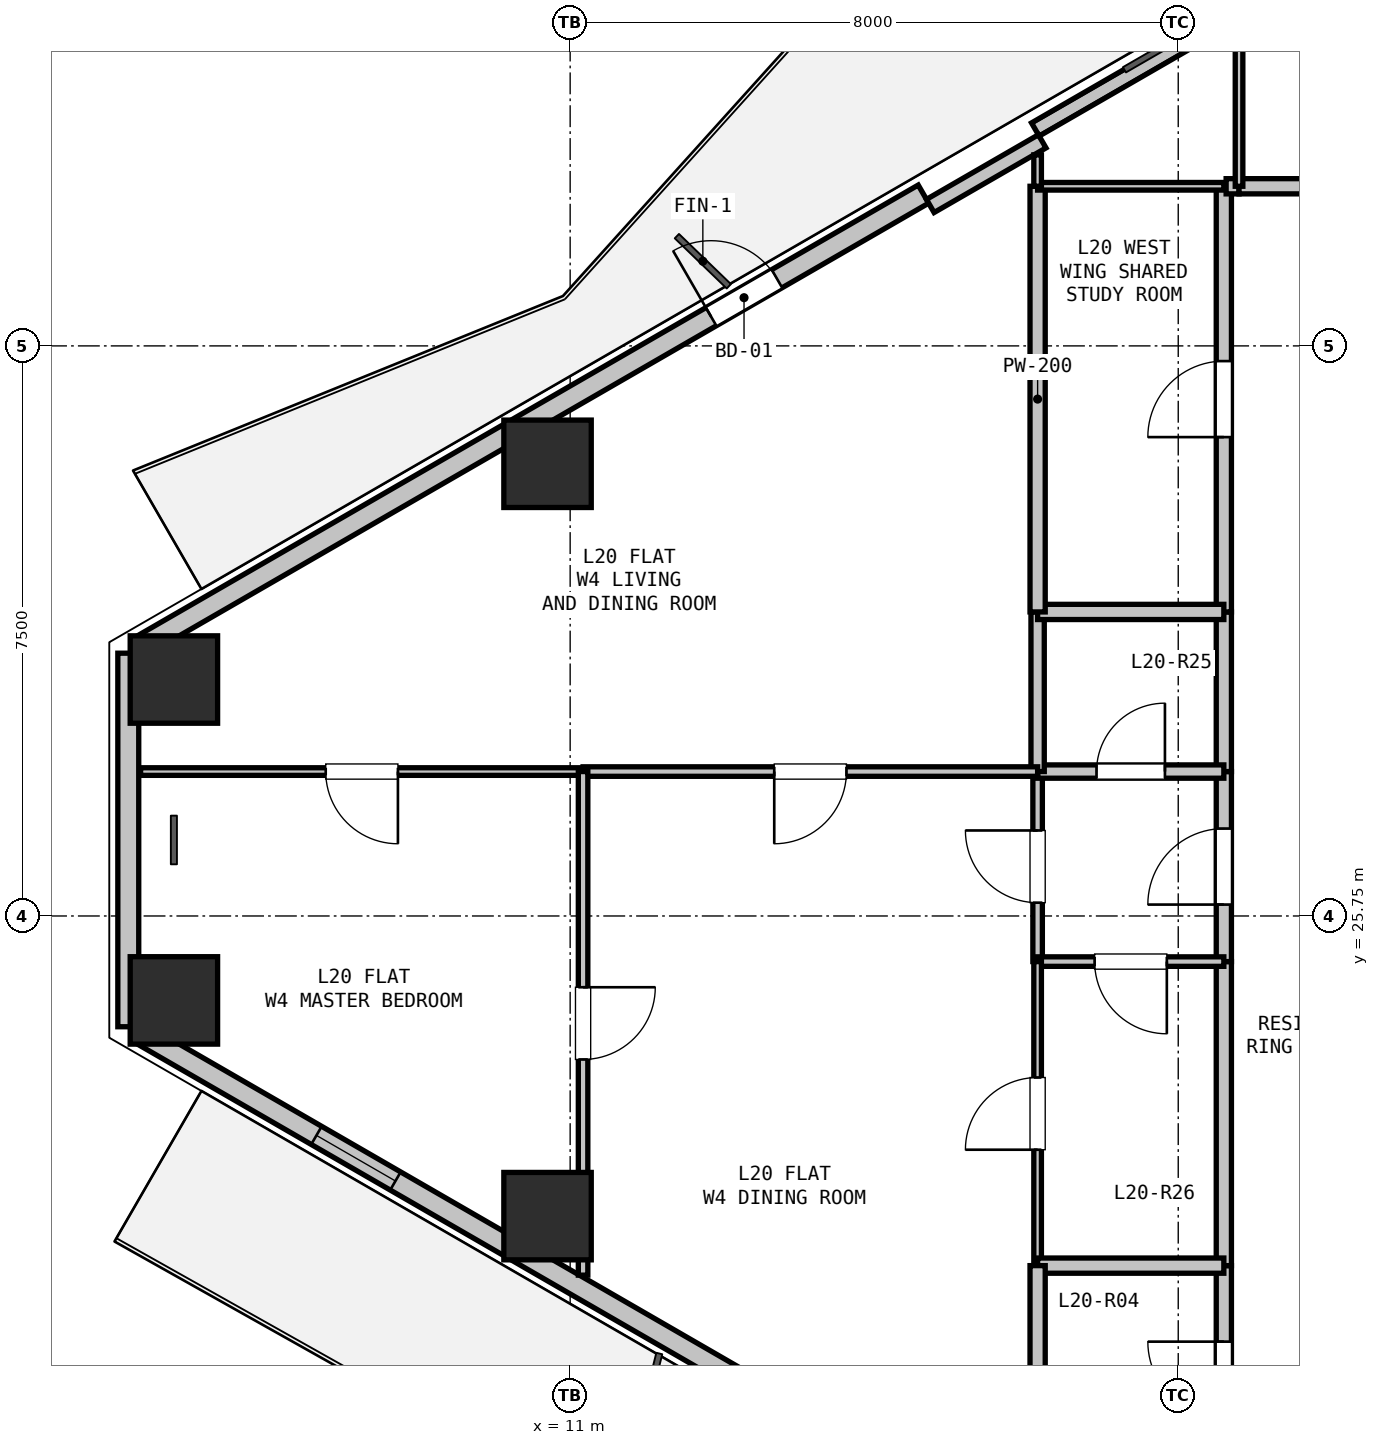
"""IFC4 building model, lengths in metres.
Left out: names, types, materials, properties, quantities, classifications, styles, units other than length and angle.
Written with IfcOpenShell. Run it as: python <this file> out.ifc"""

import sys

from ifc_helpers import new_model, si_unit, direction, frame, frame_2d, origin, origin_2d, place, context, subcontext, project, spatial, rectangle, hollow_rectangle, extrude, element, fill, save


model = new_model("IFC4")
c1 = context("Model", 3, precision=1e-05, world=origin(), true_north=direction((0.0, 1.0)))
c2 = subcontext(c1, "Body", "Model", "MODEL_VIEW")
j1 = project(units=[si_unit("LENGTHUNIT", "METRE"), si_unit("PLANEANGLEUNIT", "RADIAN")], contexts=[c1])
p1 = place(None, origin())
s1 = spatial("IfcSite", under=j1, at=p1, CompositionType="ELEMENT")
p2 = place(p1, origin())
s2 = spatial("IfcBuilding", under=s1, at=p2, CompositionType="ELEMENT")
p3 = place(p2, frame((0.0, 0.0, 76.8)))
s3 = spatial("IfcBuildingStorey", under=s2, at=p3, CompositionType="ELEMENT", Elevation=76.8)
for number, where, z_axis, x_axis in (
    (1, (5.787, 28.861, 0.0), (0.0, 0.0, 1.0), (1.0, 0.0, 0.0)),
    (2, (10.702, 31.699, 0.0), (0.0, 0.0, 1.0), (1.0, 0.0, 0.0)),
    (3, (10.702, 21.801, 0.0), (0.0, 0.0, 1.0), (1.0, 0.0, 0.0)),
    (4, (5.787, 24.639, 0.0), (0.0, 0.0, 1.0), (1.0, 0.0, 0.0)),
):
    element("IfcColumn", number, at=place(p3, frame(where, z_axis=z_axis, x_axis=x_axis)), inside=s3, PredefinedType="COLUMN", context=c2, shape_type="SweptSolid", body=[
        extrude(hollow_rectangle(XDim=1.15, YDim=1.15, WallThickness=0.032, at=origin_2d()), origin(), (0.0, 0.0, 1.0), 3.3),
    ])
p4 = place(p3, frame((5.187, 24.293, 0.0), z_axis=(0.0, 0.0, 1.0), x_axis=(0.0, 1.0, 0.0)))
e5 = element("IfcWall", 5, at=p4, inside=s3, PredefinedType="SOLIDWALL", context=c2, shape_type="SweptSolid", body=[
    extrude(rectangle(XDim=4.915, YDim=0.275, at=frame_2d((2.457, 0.0))), origin(), (0.0, 0.0, 1.0), 2.67),
])
p5 = place(p3, frame((5.317, 29.282, 0.0), z_axis=(0.0, 0.0, 1.0), x_axis=(0.866023023012, 0.500004123596, 0.0)))
e6 = element("IfcWall", 6, at=p5, inside=s3, PredefinedType="SOLIDWALL", context=c2, shape_type="SweptSolid", body=[
    extrude(rectangle(XDim=11.93, YDim=0.275, at=frame_2d((5.965, 0.0))), origin(), (0.0, 0.0, 1.0), 2.67),
])
p6 = place(p5, frame((8.704, 0.0, 0.0)))
e7 = element("IfcOpeningElement", 7, at=p6, cuts=e6, PredefinedType="OPENING", context=c2, shape_type="SweptSolid", body=[
    extrude(rectangle(XDim=1.0, YDim=2.1, at=frame_2d((0.5, 1.05))), frame((0.0, 0.147, 0.0), z_axis=(0.0, -1.0, 0.0), x_axis=(1.0, 0.0, 0.0)), (0.0, 0.0, 1.0), 0.295),
])
p7 = place(p3, frame((17.12, 36.097, 0.0), z_axis=(0.0, 0.0, 1.0), x_axis=(0.866027010039, 0.499997217876, 0.0)))
e8 = element("IfcWall", 8, at=p7, inside=s3, PredefinedType="PARAPET", context=c2, shape_type="SweptSolid", body=[
    extrude(rectangle(XDim=11.229, YDim=0.2, at=frame_2d((5.615, 0.0))), origin(), (0.0, 0.0, 1.0), 0.2),
])
p8 = place(p3, frame((15.738, 35.091, 0.0), z_axis=(0.0, 0.0, 1.0), x_axis=(0.866025371046, 0.500000056704, 0.0)))
e9 = element("IfcWall", 9, at=p8, inside=s3, PredefinedType="PARAPET", context=c2, shape_type="SweptSolid", body=[
    extrude(rectangle(XDim=1.7, YDim=0.2, at=frame_2d((0.85, 0.0))), origin(), (0.0, 0.0, 1.0), 2.67),
])
p9 = place(p3, frame((15.648, 18.253, 0.0), z_axis=(0.0, 0.0, 1.0), x_axis=(-0.866023023012, 0.500004123596, 0.0)))
e10 = element("IfcWall", 10, at=p9, inside=s3, PredefinedType="SOLIDWALL", context=c2, shape_type="SweptSolid", body=[
    extrude(rectangle(XDim=11.93, YDim=0.275, at=frame_2d((5.965, 0.0))), origin(), (0.0, 0.0, 1.0), 2.67),
])
p10 = place(p9, frame((8.021, 0.0, 0.9)))
e11 = element("IfcOpeningElement", 11, at=p10, cuts=e10, PredefinedType="OPENING", context=c2, shape_type="SweptSolid", body=[
    extrude(rectangle(XDim=1.2, YDim=1.4, at=frame_2d((0.6, 0.7))), frame((0.0, 0.147, 0.0), z_axis=(0.0, -1.0, 0.0), x_axis=(1.0, 0.0, 0.0)), (0.0, 0.0, 1.0), 0.295),
])
p11 = place(p3, frame((19.6, 18.15, 0.0), z_axis=(0.0, 0.0, 1.0), x_axis=(0.0, 1.0, 0.0)))
e12 = element("IfcWall", 12, at=p11, inside=s3, PredefinedType="PARTITIONING", context=c2, shape_type="SweptSolid", body=[
    extrude(rectangle(XDim=3.0, YDim=0.2, at=frame_2d((1.5, 0.0))), origin(), (0.0, 0.0, 1.0), 2.423),
])
p12 = place(p11, frame((1.0, 0.0, 0.0)))
e13 = element("IfcOpeningElement", 13, at=p12, cuts=e12, PredefinedType="OPENING", context=c2, shape_type="SweptSolid", body=[
    extrude(rectangle(XDim=1.0, YDim=2.15, at=frame_2d((0.5, 1.075))), frame((0.0, 0.11, 0.0), z_axis=(0.0, -1.0, 0.0), x_axis=(1.0, 0.0, 0.0)), (0.0, 0.0, 1.0), 0.22),
])
p13 = place(p3, frame((19.6, 21.15, 0.0), z_axis=(0.0, 0.0, 1.0), x_axis=(0.0, 1.0, 0.0)))
e14 = element("IfcWall", 14, at=p13, inside=s3, PredefinedType="PARTITIONING", context=c2, shape_type="SweptSolid", body=[
    extrude(rectangle(XDim=4.0, YDim=0.2, at=frame_2d((2.0, 0.0))), origin(), (0.0, 0.0, 1.0), 2.423),
])
p14 = place(p3, frame((19.6, 25.15, 0.0), z_axis=(0.0, 0.0, 1.0), x_axis=(0.0, 1.0, 0.0)))
e15 = element("IfcWall", 15, at=p14, inside=s3, PredefinedType="PARTITIONING", context=c2, shape_type="SweptSolid", body=[
    extrude(rectangle(XDim=2.5, YDim=0.2, at=frame_2d((1.25, 0.0))), origin(), (0.0, 0.0, 1.0), 3.05),
])
p15 = place(p14, frame((0.75, 0.0, 0.0)))
e16 = element("IfcOpeningElement", 16, at=p15, cuts=e15, PredefinedType="OPENING", context=c2, shape_type="SweptSolid", body=[
    extrude(rectangle(XDim=1.0, YDim=2.15, at=frame_2d((0.5, 1.075))), frame((0.0, 0.11, 0.0), z_axis=(0.0, -1.0, 0.0), x_axis=(1.0, 0.0, 0.0)), (0.0, 0.0, 1.0), 0.22),
])
p16 = place(p3, frame((19.6, 27.65, 0.0), z_axis=(0.0, 0.0, 1.0), x_axis=(0.0, 1.0, 0.0)))
e17 = element("IfcWall", 17, at=p16, inside=s3, PredefinedType="PARTITIONING", context=c2, shape_type="SweptSolid", body=[
    extrude(rectangle(XDim=2.1, YDim=0.2, at=frame_2d((1.05, 0.0))), origin(), (0.0, 0.0, 1.0), 3.05),
])
p17 = place(p3, frame((19.6, 29.75, 0.0), z_axis=(0.0, 0.0, 1.0), x_axis=(0.0, 1.0, 0.0)))
e18 = element("IfcWall", 18, at=p17, inside=s3, PredefinedType="PARTITIONING", context=c2, shape_type="SweptSolid", body=[
    extrude(rectangle(XDim=5.6, YDim=0.2, at=frame_2d((2.8, 0.0))), origin(), (0.0, 0.0, 1.0), 2.423),
])
p18 = place(p17, frame((2.3, 0.0, 0.0)))
e19 = element("IfcOpeningElement", 19, at=p18, cuts=e18, PredefinedType="OPENING", context=c2, shape_type="SweptSolid", body=[
    extrude(rectangle(XDim=1.0, YDim=2.15, at=frame_2d((0.5, 1.075))), frame((0.0, 0.11, 0.0), z_axis=(0.0, -1.0, 0.0), x_axis=(1.0, 0.0, 0.0)), (0.0, 0.0, 1.0), 0.22),
])
p19 = place(p3, frame((19.63, 35.35, 0.0), z_axis=(0.0, 0.0, 1.0), x_axis=(1.0, 0.0, 0.0)))
e20 = element("IfcWall", 20, at=p19, inside=s3, PredefinedType="PARTITIONING", context=c2, shape_type="SweptSolid", body=[
    extrude(rectangle(XDim=0.17, YDim=0.2, at=frame_2d((0.085, 0.0))), origin(), (0.0, 0.0, 1.0), 3.05),
])
p20 = place(p3, frame((19.8, 35.35, 0.0), z_axis=(0.0, 0.0, 1.0), x_axis=(1.0, 0.0, 0.0)))
e21 = element("IfcWall", 21, at=p20, inside=s3, PredefinedType="PARTITIONING", context=c2, shape_type="SweptSolid", body=[
    extrude(rectangle(XDim=5.2, YDim=0.2, at=frame_2d((2.6, 0.0))), origin(), (0.0, 0.0, 1.0), 3.05),
])
p21 = place(p20, frame((2.672, 0.0, 0.0)))
e22 = element("IfcOpeningElement", 22, at=p21, cuts=e21, PredefinedType="OPENING", context=c2, shape_type="SweptSolid", body=[
    extrude(rectangle(XDim=1.8, YDim=2.2, at=frame_2d((0.9, 1.1))), frame((0.0, 0.11, 0.0), z_axis=(0.0, -1.0, 0.0), x_axis=(1.0, 0.0, 0.0)), (0.0, 0.0, 1.0), 0.22),
])
p22 = place(p3, frame((17.15, 25.15, 0.0), z_axis=(0.0, 0.0, 1.0), x_axis=(0.0, 1.0, 0.0)))
e23 = element("IfcWall", 23, at=p22, inside=s3, PredefinedType="PARTITIONING", context=c2, shape_type="SweptSolid", body=[
    extrude(rectangle(XDim=2.5, YDim=0.125, at=frame_2d((1.25, 0.0))), origin(), (0.0, 0.0, 1.0), 3.05),
])
p23 = place(p22, frame((0.775, 0.0, 0.0)))
e24 = element("IfcOpeningElement", 24, at=p23, cuts=e23, PredefinedType="OPENING", context=c2, shape_type="SweptSolid", body=[
    extrude(rectangle(XDim=0.95, YDim=2.1, at=frame_2d((0.475, 1.05))), frame((0.0, 0.073, 0.0), z_axis=(0.0, -1.0, 0.0), x_axis=(1.0, 0.0, 0.0)), (0.0, 0.0, 1.0), 0.145),
])
p24 = place(p3, frame((17.15, 27.65, 0.0), z_axis=(0.0, 0.0, 1.0), x_axis=(1.0, 0.0, 0.0)))
e25 = element("IfcWall", 25, at=p24, inside=s3, PredefinedType="PLUMBINGWALL", context=c2, shape_type="SweptSolid", body=[
    extrude(rectangle(XDim=2.45, YDim=0.175, at=frame_2d((1.225, 0.0))), origin(), (0.0, 0.0, 1.0), 3.05),
])
p25 = place(p24, frame((0.775, 0.0, 0.0)))
e26 = element("IfcOpeningElement", 26, at=p25, cuts=e25, PredefinedType="OPENING", context=c2, shape_type="SweptSolid", body=[
    extrude(rectangle(XDim=0.9, YDim=2.1, at=frame_2d((0.45, 1.05))), frame((0.0, 0.097, 0.0), z_axis=(0.0, -1.0, 0.0), x_axis=(1.0, 0.0, 0.0)), (0.0, 0.0, 1.0), 0.195),
])
p26 = place(p3, frame((19.6, 25.15, 0.0), z_axis=(0.0, 0.0, 1.0), x_axis=(-1.0, 0.0, 0.0)))
e27 = element("IfcWall", 27, at=p26, inside=s3, PredefinedType="PARTITIONING", context=c2, shape_type="SweptSolid", body=[
    extrude(rectangle(XDim=2.45, YDim=0.125, at=frame_2d((1.225, 0.0))), origin(), (0.0, 0.0, 1.0), 3.05),
])
p27 = place(p26, frame((0.75, 0.0, 0.0)))
e28 = element("IfcOpeningElement", 28, at=p27, cuts=e27, PredefinedType="OPENING", context=c2, shape_type="SweptSolid", body=[
    extrude(rectangle(XDim=0.95, YDim=2.1, at=frame_2d((0.475, 1.05))), frame((0.0, 0.073, 0.0), z_axis=(0.0, -1.0, 0.0), x_axis=(1.0, 0.0, 0.0)), (0.0, 0.0, 1.0), 0.145),
])
p28 = place(p3, frame((17.15, 27.65, 0.0), z_axis=(0.0, 0.0, 1.0), x_axis=(0.0, 1.0, 0.0)))
e29 = element("IfcWall", 29, at=p28, inside=s3, PredefinedType="PLUMBINGWALL", context=c2, shape_type="SweptSolid", body=[
    extrude(rectangle(XDim=2.1, YDim=0.175, at=frame_2d((1.05, 0.0))), origin(), (0.0, 0.0, 1.0), 3.05),
])
p29 = place(p3, frame((17.15, 29.75, 0.0), z_axis=(0.0, 0.0, 1.0), x_axis=(1.0, 0.0, 0.0)))
e30 = element("IfcWall", 30, at=p29, inside=s3, PredefinedType="PARTITIONING", context=c2, shape_type="SweptSolid", body=[
    extrude(rectangle(XDim=2.45, YDim=0.2, at=frame_2d((1.225, 0.0))), origin(), (0.0, 0.0, 1.0), 3.05),
])
p30 = place(p3, frame((17.15, 21.15, 0.0), z_axis=(0.0, 0.0, 1.0), x_axis=(0.0, 1.0, 0.0)))
e31 = element("IfcWall", 31, at=p30, inside=s3, PredefinedType="PARTITIONING", context=c2, shape_type="SweptSolid", body=[
    extrude(rectangle(XDim=4.0, YDim=0.1, at=frame_2d((2.0, 0.0))), origin(), (0.0, 0.0, 1.0), 2.423),
])
p31 = place(p30, frame((1.525, 0.0, 0.0)))
e32 = element("IfcOpeningElement", 32, at=p31, cuts=e31, PredefinedType="OPENING", context=c2, shape_type="SweptSolid", body=[
    extrude(rectangle(XDim=0.95, YDim=2.1, at=frame_2d((0.475, 1.05))), frame((0.0, 0.06, 0.0), z_axis=(0.0, -1.0, 0.0), x_axis=(1.0, 0.0, 0.0)), (0.0, 0.0, 1.0), 0.12),
])
p32 = place(p3, frame((19.6, 21.15, 0.0), z_axis=(0.0, 0.0, 1.0), x_axis=(-1.0, 0.0, 0.0)))
e33 = element("IfcWall", 33, at=p32, inside=s3, PredefinedType="PARTITIONING", context=c2, shape_type="SweptSolid", body=[
    extrude(rectangle(XDim=2.45, YDim=0.2, at=frame_2d((1.225, 0.0))), origin(), (0.0, 0.0, 1.0), 2.423),
])
p33 = place(p3, frame((19.8, 35.35, 0.0), z_axis=(0.0, 0.0, 1.0), x_axis=(0.0, 1.0, 0.0)))
e34 = element("IfcWall", 34, at=p33, inside=s3, PredefinedType="PARTITIONING", context=c2, shape_type="SweptSolid", body=[
    extrude(rectangle(XDim=2.252, YDim=0.1, at=frame_2d((1.126, 0.0))), origin(), (0.0, 0.0, 1.0), 2.365),
])
p34 = place(p3, frame((17.15, 29.75, 0.0), z_axis=(0.0, 0.0, 1.0), x_axis=(0.0, 1.0, 0.0)))
e35 = element("IfcWall", 35, at=p34, inside=s3, PredefinedType="PARTITIONING", context=c2, shape_type="SweptSolid", body=[
    extrude(rectangle(XDim=5.6, YDim=0.2, at=frame_2d((2.8, 0.0))), origin(), (0.0, 0.0, 1.0), 2.365),
])
p35 = place(p3, frame((17.15, 35.35, 0.0), z_axis=(0.0, 0.0, 1.0), x_axis=(1.0, 0.0, 0.0)))
e36 = element("IfcWall", 36, at=p35, inside=s3, PredefinedType="PARTITIONING", context=c2, shape_type="SweptSolid", body=[
    extrude(rectangle(XDim=2.45, YDim=0.1, at=frame_2d((1.225, 0.0))), origin(), (0.0, 0.0, 1.0), 2.365),
])
p36 = place(p3, frame((17.15, 17.737, 0.0), z_axis=(0.0, 0.0, 1.0), x_axis=(0.0, 1.0, 0.0)))
e37 = element("IfcWall", 37, at=p36, inside=s3, PredefinedType="PARTITIONING", context=c2, shape_type="SweptSolid", body=[
    extrude(rectangle(XDim=3.413, YDim=0.2, at=frame_2d((1.707, 0.0))), origin(), (0.0, 0.0, 1.0), 2.365),
])
p37 = place(p3, frame((17.15, 35.763, 0.0), z_axis=(0.0, 0.0, 1.0), x_axis=(0.0, -1.0, 0.0)))
e38 = element("IfcWall", 38, at=p37, inside=s3, PredefinedType="PARTITIONING", context=c2, shape_type="SweptSolid", body=[
    extrude(rectangle(XDim=0.413, YDim=0.1, at=frame_2d((0.207, 0.0))), origin(), (0.0, 0.0, 1.0), 2.365),
])
p38 = place(p3, frame((17.15, 27.65, 0.0), z_axis=(0.0, 0.0, 1.0), x_axis=(-1.0, 0.0, 0.0)))
e39 = element("IfcWall", 39, at=p38, inside=s3, PredefinedType="PARTITIONING", context=c2, shape_type="SweptSolid", body=[
    extrude(rectangle(XDim=5.98, YDim=0.125, at=frame_2d((2.99, 0.0))), origin(), (0.0, 0.0, 1.0), 3.05),
])
p39 = place(p38, frame((2.515, 0.0, 0.0)))
e40 = element("IfcOpeningElement", 40, at=p39, cuts=e39, PredefinedType="OPENING", context=c2, shape_type="SweptSolid", body=[
    extrude(rectangle(XDim=0.95, YDim=2.1, at=frame_2d((0.475, 1.05))), frame((0.0, 0.073, 0.0), z_axis=(0.0, -1.0, 0.0), x_axis=(1.0, 0.0, 0.0)), (0.0, 0.0, 1.0), 0.145),
])
p40 = place(p3, frame((11.17, 27.65, 0.0), z_axis=(0.0, 0.0, 1.0), x_axis=(-1.0, 0.0, 0.0)))
e41 = element("IfcWall", 41, at=p40, inside=s3, PredefinedType="PARTITIONING", context=c2, shape_type="SweptSolid", body=[
    extrude(rectangle(XDim=5.822, YDim=0.1, at=frame_2d((2.911, 0.0))), origin(), (0.0, 0.0, 1.0), 2.66),
])
p41 = place(p40, frame((2.436, 0.0, 0.0)))
e42 = element("IfcOpeningElement", 42, at=p41, cuts=e41, PredefinedType="OPENING", context=c2, shape_type="SweptSolid", body=[
    extrude(rectangle(XDim=0.95, YDim=2.1, at=frame_2d((0.475, 1.05))), frame((0.0, 0.06, 0.0), z_axis=(0.0, -1.0, 0.0), x_axis=(1.0, 0.0, 0.0)), (0.0, 0.0, 1.0), 0.12),
])
p42 = place(p3, frame((11.17, 27.65, 0.0), z_axis=(0.0, 0.0, 1.0), x_axis=(0.0, -1.0, 0.0)))
e43 = element("IfcWall", 43, at=p42, inside=s3, PredefinedType="PARTITIONING", context=c2, shape_type="SweptSolid", body=[
    extrude(rectangle(XDim=6.625, YDim=0.125, at=frame_2d((3.312, 0.0))), origin(), (0.0, 0.0, 1.0), 2.365),
])
p43 = place(p42, frame((2.838, 0.0, 0.0)))
e44 = element("IfcOpeningElement", 44, at=p43, cuts=e43, PredefinedType="OPENING", context=c2, shape_type="SweptSolid", body=[
    extrude(rectangle(XDim=0.95, YDim=2.1, at=frame_2d((0.475, 1.05))), frame((0.0, 0.073, 0.0), z_axis=(0.0, -1.0, 0.0), x_axis=(1.0, 0.0, 0.0)), (0.0, 0.0, 1.0), 0.145),
])
p44 = place(p6, origin())
e45 = element("IfcDoor", 45, at=p44, inside=s3, OperationType="SINGLE_SWING_LEFT", PredefinedType="DOOR", context=c2, shape_type="SweptSolid", body=[
    extrude(rectangle(XDim=1.0, YDim=2.1, at=frame_2d((0.5, 1.05))), frame((0.0, 0.025, 0.0), z_axis=(0.0, -1.0, 0.0), x_axis=(1.0, 0.0, 0.0)), (0.0, 0.0, 1.0), 0.05),
])
fill(e7, e45)
p45 = place(p10, origin())
e46 = element("IfcWindow", 46, at=p45, inside=s3, PartitioningType="SINGLE_PANEL", PredefinedType="WINDOW", context=c2, shape_type="SweptSolid", body=[
    extrude(rectangle(XDim=1.2, YDim=1.4, at=frame_2d((0.6, 0.7))), frame((0.0, 0.03, 0.0), z_axis=(0.0, -1.0, 0.0), x_axis=(1.0, 0.0, 0.0)), (0.0, 0.0, 1.0), 0.06),
])
fill(e11, e46)
p46 = place(p15, origin())
e47 = element("IfcDoor", 47, at=p46, inside=s3, OperationType="SINGLE_SWING_LEFT", PredefinedType="DOOR", context=c2, shape_type="SweptSolid", body=[
    extrude(rectangle(XDim=1.0, YDim=2.15, at=frame_2d((0.5, 1.075))), frame((0.0, 0.025, 0.0), z_axis=(0.0, -1.0, 0.0), x_axis=(1.0, 0.0, 0.0)), (0.0, 0.0, 1.0), 0.05),
])
fill(e16, e47)
p47 = place(p18, origin())
e48 = element("IfcDoor", 48, at=p47, inside=s3, OperationType="SINGLE_SWING_LEFT", PredefinedType="DOOR", context=c2, shape_type="SweptSolid", body=[
    extrude(rectangle(XDim=1.0, YDim=2.15, at=frame_2d((0.5, 1.075))), frame((0.0, 0.025, 0.0), z_axis=(0.0, -1.0, 0.0), x_axis=(1.0, 0.0, 0.0)), (0.0, 0.0, 1.0), 0.05),
])
fill(e19, e48)
p48 = place(p12, origin())
e49 = element("IfcDoor", 49, at=p48, inside=s3, OperationType="SINGLE_SWING_RIGHT", PredefinedType="DOOR", context=c2, shape_type="SweptSolid", body=[
    extrude(rectangle(XDim=1.0, YDim=2.15, at=frame_2d((0.5, 1.075))), frame((0.0, 0.025, 0.0), z_axis=(0.0, -1.0, 0.0), x_axis=(1.0, 0.0, 0.0)), (0.0, 0.0, 1.0), 0.05),
])
fill(e13, e49)
p49 = place(p25, origin())
e50 = element("IfcDoor", 50, at=p49, inside=s3, OperationType="SINGLE_SWING_RIGHT", PredefinedType="DOOR", context=c2, shape_type="SweptSolid", body=[
    extrude(rectangle(XDim=0.9, YDim=2.1, at=frame_2d((0.45, 1.05))), frame((0.0, 0.025, 0.0), z_axis=(0.0, -1.0, 0.0), x_axis=(1.0, 0.0, 0.0)), (0.0, 0.0, 1.0), 0.05),
])
fill(e26, e50)
p50 = place(p27, origin())
e51 = element("IfcDoor", 51, at=p50, inside=s3, OperationType="SINGLE_SWING_LEFT", PredefinedType="DOOR", context=c2, shape_type="SweptSolid", body=[
    extrude(rectangle(XDim=0.95, YDim=2.1, at=frame_2d((0.475, 1.05))), frame((0.0, 0.025, 0.0), z_axis=(0.0, -1.0, 0.0), x_axis=(1.0, 0.0, 0.0)), (0.0, 0.0, 1.0), 0.05),
])
fill(e28, e51)
p51 = place(p23, origin())
e52 = element("IfcDoor", 52, at=p51, inside=s3, OperationType="SINGLE_SWING_RIGHT", PredefinedType="DOOR", context=c2, shape_type="SweptSolid", body=[
    extrude(rectangle(XDim=0.95, YDim=2.1, at=frame_2d((0.475, 1.05))), frame((0.0, 0.025, 0.0), z_axis=(0.0, -1.0, 0.0), x_axis=(1.0, 0.0, 0.0)), (0.0, 0.0, 1.0), 0.05),
])
fill(e24, e52)
p52 = place(p31, origin())
e53 = element("IfcDoor", 53, at=p52, inside=s3, OperationType="SINGLE_SWING_LEFT", PredefinedType="DOOR", context=c2, shape_type="SweptSolid", body=[
    extrude(rectangle(XDim=0.95, YDim=2.1, at=frame_2d((0.475, 1.05))), frame((0.0, 0.025, 0.0), z_axis=(0.0, -1.0, 0.0), x_axis=(1.0, 0.0, 0.0)), (0.0, 0.0, 1.0), 0.05),
])
fill(e32, e53)
p53 = place(p41, origin())
e54 = element("IfcDoor", 54, at=p53, inside=s3, OperationType="SINGLE_SWING_LEFT", PredefinedType="DOOR", context=c2, shape_type="SweptSolid", body=[
    extrude(rectangle(XDim=0.95, YDim=2.1, at=frame_2d((0.475, 1.05))), frame((0.0, 0.025, 0.0), z_axis=(0.0, -1.0, 0.0), x_axis=(1.0, 0.0, 0.0)), (0.0, 0.0, 1.0), 0.05),
])
fill(e42, e54)
p54 = place(p39, origin())
e55 = element("IfcDoor", 55, at=p54, inside=s3, OperationType="SINGLE_SWING_RIGHT", PredefinedType="DOOR", context=c2, shape_type="SweptSolid", body=[
    extrude(rectangle(XDim=0.95, YDim=2.1, at=frame_2d((0.475, 1.05))), frame((0.0, 0.025, 0.0), z_axis=(0.0, -1.0, 0.0), x_axis=(1.0, 0.0, 0.0)), (0.0, 0.0, 1.0), 0.05),
])
fill(e40, e55)
p55 = place(p43, origin())
e56 = element("IfcDoor", 56, at=p55, inside=s3, OperationType="SINGLE_SWING_LEFT", PredefinedType="DOOR", context=c2, shape_type="SweptSolid", body=[
    extrude(rectangle(XDim=0.95, YDim=2.1, at=frame_2d((0.475, 1.05))), frame((0.0, 0.025, 0.0), z_axis=(0.0, -1.0, 0.0), x_axis=(1.0, 0.0, 0.0)), (0.0, 0.0, 1.0), 0.05),
])
fill(e44, e56)
save(model, sys.argv[1])
